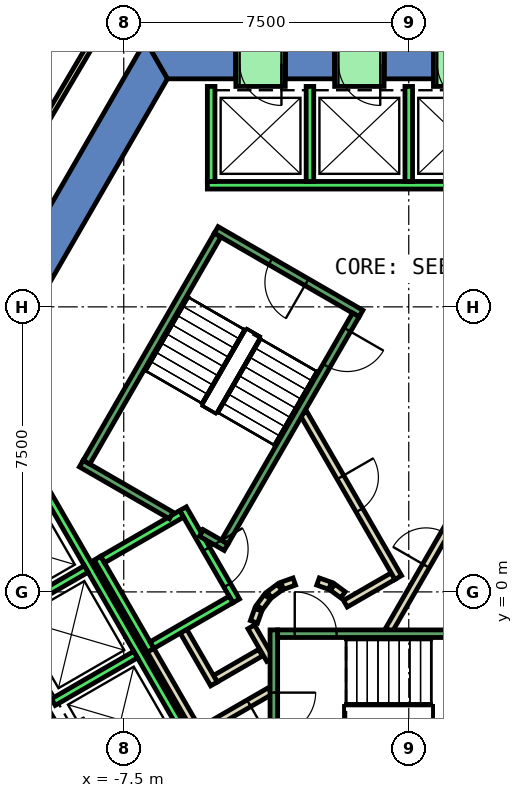
"""IFC4 building model, lengths in metres.
Left out: names, types, materials, properties, quantities, classifications, styles, units other than length and angle.
Written with IfcOpenShell. Run it as: python <this file> out.ifc"""

import sys

from ifc_helpers import new_model, si_unit, direction, frame, frame_2d, origin, place, context, subcontext, project, spatial, polyline, rectangle, outline, extrude, element, fill, save


model = new_model("IFC4")
c1 = context("Model", 3, precision=1e-05, world=origin(), true_north=direction((0.0, 1.0)))
c2 = subcontext(c1, "Body", "Model", "MODEL_VIEW")
j1 = project(units=[si_unit("LENGTHUNIT", "METRE"), si_unit("PLANEANGLEUNIT", "RADIAN")], contexts=[c1])
p1 = place(None, origin())
s1 = spatial("IfcSite", under=j1, at=p1, CompositionType="ELEMENT")
p2 = place(p1, origin())
s2 = spatial("IfcBuilding", under=s1, at=p2, CompositionType="ELEMENT")
p3 = place(p2, origin())
s3 = spatial("IfcBuildingStorey", under=s2, at=p3, CompositionType="ELEMENT", Elevation=0.0)
p4 = place(p3, frame((0.0, 0.0, -0.5)))
e1 = element("IfcWall", 1, at=p4, inside=s3, PredefinedType="SHEAR", context=c2, shape_type="SweptSolid", body=[
    extrude(outline(polyline([(-0.65, 14.5), (-0.65, 13.5), (0.65, 13.5), (0.65, 14.5), (-0.65, 14.5)])), origin(), (0.0, 0.0, 1.0), 9.05),
])
p5 = place(p3, frame((0.0, 0.0, -0.5)))
e2 = element("IfcWall", 2, at=p5, inside=s3, PredefinedType="SHEAR", context=c2, shape_type="SweptSolid", body=[
    extrude(outline(polyline([(-3.25, 14.5), (-3.25, 13.5), (-1.95, 13.5), (-1.95, 14.5), (-3.25, 14.5)])), origin(), (0.0, 0.0, 1.0), 9.05),
])
p6 = place(p3, frame((0.0, 0.0, -0.5)))
e3 = element("IfcWall", 3, at=p6, inside=s3, PredefinedType="SHEAR", context=c2, shape_type="SweptSolid", body=[
    extrude(outline(polyline([(-4.55, 13.5), (-4.55, 14.5), (-6.928, 14.5), (-6.351, 13.5), (-4.55, 13.5)])), origin(), (0.0, 0.0, 1.0), 9.05),
])
p7 = place(p3, frame((0.0, 0.0, 3.6)))
e4 = element("IfcWall", 4, at=p7, inside=s3, PredefinedType="SHEAR", context=c2, shape_type="SweptSolid", body=[
    extrude(outline(polyline([(0.65, 14.5), (0.65, 13.5), (1.95, 13.5), (1.95, 14.5), (0.65, 14.5)])), origin(), (0.0, 0.0, 1.0), 4.95),
])
p8 = place(p3, frame((0.0, 0.0, 3.6)))
e5 = element("IfcWall", 5, at=p8, inside=s3, PredefinedType="SHEAR", context=c2, shape_type="SweptSolid", body=[
    extrude(outline(polyline([(-1.95, 14.5), (-1.95, 13.5), (-0.65, 13.5), (-0.65, 14.5), (-1.95, 14.5)])), origin(), (0.0, 0.0, 1.0), 4.95),
])
p9 = place(p3, frame((0.0, 0.0, 3.6)))
e6 = element("IfcWall", 6, at=p9, inside=s3, PredefinedType="SHEAR", context=c2, shape_type="SweptSolid", body=[
    extrude(outline(polyline([(-4.55, 14.5), (-4.55, 13.5), (-3.25, 13.5), (-3.25, 14.5), (-4.55, 14.5)])), origin(), (0.0, 0.0, 1.0), 4.95),
])
p10 = place(p3, frame((0.0, 0.0, -0.5)))
e7 = element("IfcWall", 7, at=p10, inside=s3, PredefinedType="SHEAR", context=c2, shape_type="SweptSolid", body=[
    extrude(outline(polyline([(-12.267, 5.252), (-11.402, 4.752), (-6.351, 13.5), (-6.928, 14.5), (-12.267, 5.252)])), origin(), (0.0, 0.0, 1.0), 9.05),
])
p11 = place(p3, frame((0.0, 0.0, -0.5)))
e8 = element("IfcWall", 8, at=p11, inside=s3, PredefinedType="SHEAR", context=c2, shape_type="SweptSolid", body=[
    extrude(outline(polyline([(-10.067, -4.063), (-9.201, -3.563), (-9.851, -2.437), (-10.717, -2.937), (-10.067, -4.063)])), origin(), (0.0, 0.0, 1.0), 9.05),
])
p12 = place(p3, frame((-3.9, -1.599, 0.0), z_axis=(0.0, 0.0, 1.0), x_axis=(-0.865969445389, -0.500096910261, 0.0)))
e9 = element("IfcWall", 9, at=p12, inside=s3, PredefinedType="PARTITIONING", context=c2, shape_type="SweptSolid", body=[
    extrude(rectangle(XDim=1.373, YDim=0.2, at=frame_2d((0.687, 0.0))), origin(), (0.0, 0.0, 1.0), 8.55),
])
p13 = place(p3, frame((-5.126, -2.422, 0.0), z_axis=(0.0, 0.0, 1.0), x_axis=(-0.500062241894, 0.865989465428, 0.0)))
e10 = element("IfcWall", 10, at=p13, inside=s3, PredefinedType="PARTITIONING", context=c2, shape_type="SweptSolid", body=[
    extrude(rectangle(XDim=1.7, YDim=0.2, at=frame_2d((0.85, 0.0))), origin(), (0.0, 0.0, 1.0), 8.55),
])
p14 = place(p3, frame((-5.492, -3.788, 0.0), z_axis=(0.0, 0.0, 1.0), x_axis=(-0.500008949224, 0.866020236886, 0.0)))
e11 = element("IfcWall", 11, at=p14, inside=s3, PredefinedType="PARTITIONING", context=c2, shape_type="SweptSolid", body=[
    extrude(rectangle(XDim=2.68, YDim=0.2, at=frame_2d((1.34, 0.0))), origin(), (0.0, 0.0, 1.0), 8.55),
])
p15 = place(p3, frame((-4.145, -0.92, 0.0), z_axis=(0.0, 0.0, 1.0), x_axis=(0.499743786207, -0.866173278362, 0.0)))
e12 = element("IfcWall", 12, at=p15, inside=s3, PredefinedType="PARTITIONING", context=c2, shape_type="SweptSolid", body=[
    extrude(rectangle(XDim=0.991, YDim=0.2, at=frame_2d((0.495, 0.0))), origin(), (0.0, 0.0, 1.0), 8.55),
])
p16 = place(p3, frame((-3.65, -2.61, 0.0), z_axis=(0.0, 0.0, 1.0), x_axis=(-0.866072462134, -0.499918483688, 0.0)))
e13 = element("IfcWall", 13, at=p16, inside=s3, PredefinedType="PARTITIONING", context=c2, shape_type="SweptSolid", body=[
    extrude(rectangle(XDim=2.084, YDim=0.2, at=frame_2d((1.042, 0.0))), origin(), (0.0, 0.0, 1.0), 8.55),
])
p17 = place(p16, frame((0.642, 0.0, 0.0)))
e14 = element("IfcOpeningElement", 14, at=p17, cuts=e13, PredefinedType="OPENING", context=c2, shape_type="SweptSolid", body=[
    extrude(rectangle(XDim=0.9, YDim=2.1, at=frame_2d((0.45, 1.05))), frame((0.0, 0.11, 0.0), z_axis=(0.0, -1.0, 0.0), x_axis=(1.0, 0.0, 0.0)), (0.0, 0.0, 1.0), 0.22),
])
p18 = place(p3, frame((-0.52, -1.0, 0.0), z_axis=(0.0, 0.0, 1.0), x_axis=(0.50011622646, 0.865958290007, 0.0)))
e15 = element("IfcWall", 15, at=p18, inside=s3, PredefinedType="PARTITIONING", context=c2, shape_type="SweptSolid", body=[
    extrude(rectangle(XDim=4.991, YDim=0.2, at=frame_2d((2.496, 0.0))), origin(), (0.0, 0.0, 1.0), 8.55),
])
p19 = place(p18, frame((1.945, 0.0, 0.0)))
e16 = element("IfcOpeningElement", 16, at=p19, cuts=e15, PredefinedType="OPENING", context=c2, shape_type="SweptSolid", body=[
    extrude(rectangle(XDim=1.0, YDim=2.1, at=frame_2d((0.5, 1.05))), frame((0.0, 0.11, 0.0), z_axis=(0.0, -1.0, 0.0), x_axis=(1.0, 0.0, 0.0)), (0.0, 0.0, 1.0), 0.22),
])
p20 = place(p3, frame((-0.412, 0.414, 0.0), z_axis=(0.0, 0.0, 1.0), x_axis=(-0.866017369001, -0.500013916395, 0.0)))
e17 = element("IfcWall", 17, at=p20, inside=s3, PredefinedType="PARTITIONING", context=c2, shape_type="SweptSolid", body=[
    extrude(rectangle(XDim=1.45, YDim=0.2, at=frame_2d((0.725, 0.0))), origin(), (0.0, 0.0, 1.0), 8.55),
])
p21 = place(p3, frame((-1.731, -0.077, 0.0), z_axis=(0.0, 0.0, 1.0), x_axis=(-0.804311165252, 0.594208338422, 0.0)))
e18 = element("IfcWall", 18, at=p21, inside=s3, PredefinedType="PARTITIONING", context=c2, shape_type="SweptSolid", body=[
    extrude(rectangle(XDim=0.338, YDim=0.2, at=frame_2d((0.169, 0.0))), origin(), (0.0, 0.0, 1.0), 8.55),
])
p22 = place(p3, frame((-2.07, 0.16, 0.0), z_axis=(0.0, 0.0, 1.0), x_axis=(-0.942199461132, 0.335052496547, 0.0)))
e19 = element("IfcWall", 19, at=p22, inside=s3, PredefinedType="PARTITIONING", context=c2, shape_type="SweptSolid", body=[
    extrude(rectangle(XDim=0.337, YDim=0.2, at=frame_2d((0.169, 0.0))), origin(), (0.0, 0.0, 1.0), 8.55),
])
p23 = place(p3, frame((-3.012, 0.273, 0.0), z_axis=(0.0, 0.0, 1.0), x_axis=(-0.942280615813, -0.334824194261, 0.0)))
e20 = element("IfcWall", 20, at=p23, inside=s3, PredefinedType="PARTITIONING", context=c2, shape_type="SweptSolid", body=[
    extrude(rectangle(XDim=0.338, YDim=0.2, at=frame_2d((0.169, 0.0))), origin(), (0.0, 0.0, 1.0), 8.55),
])
p24 = place(p3, frame((-3.397, 0.124, 0.0), z_axis=(0.0, 0.0, 1.0), x_axis=(-0.804311165252, -0.594208338422, 0.0)))
e21 = element("IfcWall", 21, at=p24, inside=s3, PredefinedType="PARTITIONING", context=c2, shape_type="SweptSolid", body=[
    extrude(rectangle(XDim=0.338, YDim=0.2, at=frame_2d((0.169, 0.0))), origin(), (0.0, 0.0, 1.0), 8.55),
])
p25 = place(p3, frame((-3.723, -0.131, 0.0), z_axis=(0.0, 0.0, 1.0), x_axis=(-0.594675113454, -0.803966112121, 0.0)))
e22 = element("IfcWall", 22, at=p25, inside=s3, PredefinedType="PARTITIONING", context=c2, shape_type="SweptSolid", body=[
    extrude(rectangle(XDim=0.338, YDim=0.2, at=frame_2d((0.169, 0.0))), origin(), (0.0, 0.0, 1.0), 8.55),
])
p26 = place(p3, frame((-3.96, -0.47, 0.0), z_axis=(0.0, 0.0, 1.0), x_axis=(-0.334824194261, -0.942280615813, 0.0)))
e23 = element("IfcWall", 23, at=p26, inside=s3, PredefinedType="PARTITIONING", context=c2, shape_type="SweptSolid", body=[
    extrude(rectangle(XDim=0.338, YDim=0.2, at=frame_2d((0.169, 0.0))), origin(), (0.0, 0.0, 1.0), 8.55),
])
p27 = place(p3, frame((-2.771, 4.7, 0.0), z_axis=(0.0, 0.0, 1.0), x_axis=(0.499969479948, -0.866043023828, 0.0)))
e24 = element("IfcWall", 24, at=p27, inside=s3, PredefinedType="PARTITIONING", context=c2, shape_type="SweptSolid", body=[
    extrude(rectangle(XDim=4.99, YDim=0.2, at=frame_2d((2.495, 0.0))), origin(), (0.0, 0.0, 1.0), 8.55),
])
p28 = place(p27, frame((1.945, 0.0, 0.0)))
e25 = element("IfcOpeningElement", 25, at=p28, cuts=e24, PredefinedType="OPENING", context=c2, shape_type="SweptSolid", body=[
    extrude(rectangle(XDim=1.0, YDim=2.1, at=frame_2d((0.5, 1.05))), frame((0.0, 0.11, 0.0), z_axis=(0.0, -1.0, 0.0), x_axis=(1.0, 0.0, 0.0)), (0.0, 0.0, 1.0), 0.22),
])
p29 = place(p3, frame((-18.107, 2.457, 0.0), z_axis=(0.0, 0.0, 1.0), x_axis=(0.499997929316, 0.866026599291, 0.0)))
e26 = element("IfcWall", 26, at=p29, inside=s3, PredefinedType="PARTITIONING", context=c2, shape_type="SweptSolid", body=[
    extrude(rectangle(XDim=18.182, YDim=0.1, at=frame_2d((9.091, 0.0))), origin(), (0.0, 0.0, 1.0), 8.55),
])
p30 = place(p29, frame((4.754, 0.0, 0.0)))
e27 = element("IfcOpeningElement", 27, at=p30, cuts=e26, PredefinedType="OPENING", context=c2, shape_type="SweptSolid", body=[
    extrude(rectangle(XDim=1.8, YDim=2.1, at=frame_2d((0.9, 1.05))), frame((0.0, 0.06, 0.0), z_axis=(0.0, -1.0, 0.0), x_axis=(1.0, 0.0, 0.0)), (0.0, 0.0, 1.0), 0.12),
])
p31 = place(p3, frame((-7.104, 16.539, 0.0), z_axis=(0.0, 0.0, 1.0), x_axis=(-0.508323844405, -0.861165993992, 0.0)))
e28 = element("IfcWall", 28, at=p31, inside=s3, PredefinedType="PARTITIONING", context=c2, shape_type="SweptSolid", body=[
    extrude(rectangle(XDim=7.182, YDim=0.15, at=frame_2d((3.591, 0.0))), origin(), (0.0, 0.0, 1.0), 8.55),
])
p32 = place(p3, frame((5.3, 10.7, 0.0), z_axis=(0.0, 0.0, 1.0), x_axis=(-1.0, 0.0, 0.0)))
e29 = element("IfcWall", 29, at=p32, inside=s3, PredefinedType="STANDARD", context=c2, shape_type="SweptSolid", body=[
    extrude(rectangle(XDim=10.6, YDim=0.2, at=frame_2d((5.3, 0.0))), origin(), (0.0, 0.0, 1.0), 8.55),
])
for number, where, z_axis, x_axis in (
    (30, (0.0, 10.8, 0.0), (0.0, 0.0, 1.0), (0.0, 1.0, 0.0)),
    (31, (-2.6, 10.8, 0.0), (0.0, 0.0, 1.0), (0.0, 1.0, 0.0)),
    (32, (-5.2, 10.8, 0.0), (0.0, 0.0, 1.0), (0.0, 1.0, 0.0)),
):
    element("IfcWall", number, at=place(p3, frame(where, z_axis=z_axis, x_axis=x_axis)), inside=s3, PredefinedType="STANDARD", context=c2, shape_type="SweptSolid", body=[
        extrude(rectangle(XDim=2.5, YDim=0.2, at=frame_2d((1.25, 0.0))), origin(), (0.0, 0.0, 1.0), 8.55),
    ])
p33 = place(p3, frame((-5.94, 2.188, 0.0), z_axis=(0.0, 0.0, 1.0), x_axis=(0.49994636267, -0.866056369097, 0.0)))
e33 = element("IfcWall", 33, at=p33, inside=s3, PredefinedType="STANDARD", context=c2, shape_type="SweptSolid", body=[
    extrude(rectangle(XDim=2.8, YDim=0.2, at=frame_2d((1.4, 0.0))), origin(), (0.0, 0.0, 1.0), 8.55),
])
p34 = place(p33, frame((1.225, 0.0, 0.0)))
e34 = element("IfcOpeningElement", 34, at=p34, cuts=e33, PredefinedType="OPENING", context=c2, shape_type="SweptSolid", body=[
    extrude(rectangle(XDim=1.1, YDim=2.1, at=frame_2d((0.55, 1.05))), frame((0.0, 0.11, 0.0), z_axis=(0.0, -1.0, 0.0), x_axis=(1.0, 0.0, 0.0)), (0.0, 0.0, 1.0), 0.22),
])
p35 = place(p3, frame((-8.192, 0.888, 0.0), z_axis=(0.0, 0.0, 1.0), x_axis=(0.49994636267, -0.866056369097, 0.0)))
e35 = element("IfcWall", 35, at=p35, inside=s3, PredefinedType="STANDARD", context=c2, shape_type="SweptSolid", body=[
    extrude(rectangle(XDim=2.8, YDim=0.2, at=frame_2d((1.4, 0.0))), origin(), (0.0, 0.0, 1.0), 8.55),
])
for number, where, z_axis, x_axis in (
    (36, (-5.977, 2.052, 0.0), (0.0, 0.0, 1.0), (-0.866, -0.5, 0.0)),
    (37, (-4.677, -0.2, 0.0), (0.0, 0.0, 1.0), (-0.866, -0.5, 0.0)),
):
    element("IfcWall", number, at=place(p3, frame(where, z_axis=z_axis, x_axis=x_axis)), inside=s3, PredefinedType="STANDARD", context=c2, shape_type="SweptSolid", body=[
        extrude(rectangle(XDim=2.399, YDim=0.2, at=frame_2d((1.2, 0.0))), origin(), (0.0, 0.0, 1.0), 8.55),
    ])
p36 = place(p3, frame((-9.751, 2.99, 0.0), z_axis=(0.0, 0.0, 1.0), x_axis=(0.50000090737, -0.866024879913, 0.0)))
e38 = element("IfcWall", 38, at=p36, inside=s3, PredefinedType="STANDARD", context=c2, shape_type="SweptSolid", body=[
    extrude(rectangle(XDim=10.6, YDim=0.2, at=frame_2d((5.3, 0.0))), origin(), (0.0, 0.0, 1.0), 8.55),
])
for number, where, z_axis, x_axis in (
    (39, (-8.488, 0.602, 0.0), (0.0, 0.0, 1.0), (-0.866, -0.5, 0.0)),
    (40, (-7.188, -1.65, 0.0), (0.0, 0.0, 1.0), (-0.866, -0.5, 0.0)),
):
    element("IfcWall", number, at=place(p3, frame(where, z_axis=z_axis, x_axis=x_axis)), inside=s3, PredefinedType="STANDARD", context=c2, shape_type="SweptSolid", body=[
        extrude(rectangle(XDim=2.5, YDim=0.2, at=frame_2d((1.25, 0.0))), origin(), (0.0, 0.0, 1.0), 8.55),
    ])
p37 = place(p3, frame((1.95, 13.9, 0.0), z_axis=(0.0, 0.0, 1.0), x_axis=(-1.0, 0.0, 0.0)))
e41 = element("IfcWall", 41, at=p37, inside=s3, PredefinedType="STANDARD", context=c2, shape_type="SweptSolid", body=[
    extrude(rectangle(XDim=1.3, YDim=1.2, at=frame_2d((0.65, 0.0))), origin(), (0.0, 0.0, 1.0), 2.4),
])
p38 = place(p37, frame((0.1, 0.0, 0.0)))
e42 = element("IfcOpeningElement", 42, at=p38, cuts=e41, PredefinedType="OPENING", context=c2, shape_type="SweptSolid", body=[
    extrude(rectangle(XDim=1.1, YDim=2.3, at=frame_2d((0.55, 1.15))), frame((0.0, 0.61, 0.0), z_axis=(0.0, -1.0, 0.0), x_axis=(1.0, 0.0, 0.0)), (0.0, 0.0, 1.0), 1.22),
])
p39 = place(p3, frame((-0.65, 13.9, 0.0), z_axis=(0.0, 0.0, 1.0), x_axis=(-1.0, 0.0, 0.0)))
e43 = element("IfcWall", 43, at=p39, inside=s3, PredefinedType="STANDARD", context=c2, shape_type="SweptSolid", body=[
    extrude(rectangle(XDim=1.3, YDim=1.2, at=frame_2d((0.65, 0.0))), origin(), (0.0, 0.0, 1.0), 2.4),
])
p40 = place(p39, frame((0.1, 0.0, 0.0)))
e44 = element("IfcOpeningElement", 44, at=p40, cuts=e43, PredefinedType="OPENING", context=c2, shape_type="SweptSolid", body=[
    extrude(rectangle(XDim=1.1, YDim=2.3, at=frame_2d((0.55, 1.15))), frame((0.0, 0.61, 0.0), z_axis=(0.0, -1.0, 0.0), x_axis=(1.0, 0.0, 0.0)), (0.0, 0.0, 1.0), 1.22),
])
p41 = place(p3, frame((-3.25, 13.9, 0.0), z_axis=(0.0, 0.0, 1.0), x_axis=(-1.0, 0.0, 0.0)))
e45 = element("IfcWall", 45, at=p41, inside=s3, PredefinedType="STANDARD", context=c2, shape_type="SweptSolid", body=[
    extrude(rectangle(XDim=1.3, YDim=1.2, at=frame_2d((0.65, 0.0))), origin(), (0.0, 0.0, 1.0), 2.4),
])
p42 = place(p41, frame((0.1, 0.0, 0.0)))
e46 = element("IfcOpeningElement", 46, at=p42, cuts=e45, PredefinedType="OPENING", context=c2, shape_type="SweptSolid", body=[
    extrude(rectangle(XDim=1.1, YDim=2.3, at=frame_2d((0.55, 1.15))), frame((0.0, 0.61, 0.0), z_axis=(0.0, -1.0, 0.0), x_axis=(1.0, 0.0, 0.0)), (0.0, 0.0, 1.0), 1.22),
])
p43 = place(p3, frame((-3.55, -1.0, 0.0), z_axis=(0.0, 0.0, 1.0), x_axis=(0.0, -1.0, 0.0)))
e47 = element("IfcWall", 47, at=p43, inside=s3, PredefinedType="STANDARD", context=c2, shape_type="SweptSolid", body=[
    extrude(rectangle(XDim=4.4, YDim=0.2, at=frame_2d((2.2, 0.0))), origin(), (0.0, 0.0, 1.0), 8.55),
])
p44 = place(p43, frame((1.65, 0.0, 0.0)))
e48 = element("IfcOpeningElement", 48, at=p44, cuts=e47, PredefinedType="OPENING", context=c2, shape_type="SweptSolid", body=[
    extrude(rectangle(XDim=1.1, YDim=2.2, at=frame_2d((0.55, 1.1))), frame((0.0, 0.11, 0.0), z_axis=(0.0, -1.0, 0.0), x_axis=(1.0, 0.0, 0.0)), (0.0, 0.0, 1.0), 0.22),
])
p45 = place(p3, frame((-3.45, -1.1, 0.0), z_axis=(0.0, 0.0, 1.0), x_axis=(1.0, 0.0, 0.0)))
e49 = element("IfcWall", 49, at=p45, inside=s3, PredefinedType="STANDARD", context=c2, shape_type="SweptSolid", body=[
    extrude(rectangle(XDim=6.9, YDim=0.2, at=frame_2d((3.45, 0.0))), origin(), (0.0, 0.0, 1.0), 8.55),
])
p46 = place(p45, frame((0.45, 0.0, 0.0)))
e50 = element("IfcOpeningElement", 50, at=p46, cuts=e49, PredefinedType="OPENING", context=c2, shape_type="SweptSolid", body=[
    extrude(rectangle(XDim=1.1, YDim=2.2, at=frame_2d((0.55, 1.1))), frame((0.0, 0.11, 0.0), z_axis=(0.0, -1.0, 0.0), x_axis=(1.0, 0.0, 0.0)), (0.0, 0.0, 1.0), 0.22),
])
p47 = place(p3, frame((-1.256, 7.324, 0.0), z_axis=(0.0, 0.0, 1.0), x_axis=(-0.866046073146, 0.499964197906, 0.0)))
e51 = element("IfcWall", 51, at=p47, inside=s3, PredefinedType="STANDARD", context=c2, shape_type="SweptSolid", body=[
    extrude(rectangle(XDim=4.4, YDim=0.2, at=frame_2d((2.2, 0.0))), origin(), (0.0, 0.0, 1.0), 8.55),
])
p48 = place(p47, frame((1.65, 0.0, 0.0)))
e52 = element("IfcOpeningElement", 52, at=p48, cuts=e51, PredefinedType="OPENING", context=c2, shape_type="SweptSolid", body=[
    extrude(rectangle(XDim=1.1, YDim=2.2, at=frame_2d((0.55, 1.1))), frame((0.0, 0.11, 0.0), z_axis=(0.0, -1.0, 0.0), x_axis=(1.0, 0.0, 0.0)), (0.0, 0.0, 1.0), 0.22),
])
p49 = place(p3, frame((-6.25, 2.01, 0.0), z_axis=(0.0, 0.0, 1.0), x_axis=(-0.86611865017, 0.499838457731, 0.0)))
e53 = element("IfcWall", 53, at=p49, inside=s3, PredefinedType="STANDARD", context=c2, shape_type="SweptSolid", body=[
    extrude(rectangle(XDim=2.733, YDim=0.2, at=frame_2d((1.366, 0.0))), origin(), (0.0, 0.0, 1.0), 8.55),
])
p50 = place(p3, frame((-4.806, 1.176, 0.0), z_axis=(0.0, 0.0, 1.0), x_axis=(-0.866558586415, 0.499075361355, 0.0)))
e54 = element("IfcWall", 54, at=p50, inside=s3, PredefinedType="STANDARD", context=c2, shape_type="SweptSolid", body=[
    extrude(rectangle(XDim=0.751, YDim=0.2, at=frame_2d((0.376, 0.0))), origin(), (0.0, 0.0, 1.0), 8.55),
])
p51 = place(p3, frame((-1.393, 7.288, 0.0), z_axis=(0.0, 0.0, 1.0), x_axis=(-0.499963383562, -0.866046543262, 0.0)))
e55 = element("IfcWall", 55, at=p51, inside=s3, PredefinedType="STANDARD", context=c2, shape_type="SweptSolid", body=[
    extrude(rectangle(XDim=6.9, YDim=0.2, at=frame_2d((3.45, 0.0))), origin(), (0.0, 0.0, 1.0), 8.55),
])
p52 = place(p51, frame((0.45, 0.0, 0.0)))
e56 = element("IfcOpeningElement", 56, at=p52, cuts=e55, PredefinedType="OPENING", context=c2, shape_type="SweptSolid", body=[
    extrude(rectangle(XDim=1.1, YDim=2.2, at=frame_2d((0.55, 1.1))), frame((0.0, 0.11, 0.0), z_axis=(0.0, -1.0, 0.0), x_axis=(1.0, 0.0, 0.0)), (0.0, 0.0, 1.0), 0.22),
])
p53 = place(p3, frame((-5.03, 9.388, 0.0), z_axis=(0.0, 0.0, 1.0), x_axis=(-0.499978703459, -0.866037698999, 0.0)))
e57 = element("IfcWall", 57, at=p53, inside=s3, PredefinedType="STANDARD", context=c2, shape_type="SweptSolid", body=[
    extrude(rectangle(XDim=6.9, YDim=0.2, at=frame_2d((3.45, 0.0))), origin(), (0.0, 0.0, 1.0), 8.55),
])
p54 = place(p19, origin())
e58 = element("IfcDoor", 58, at=p54, inside=s3, OperationType="SINGLE_SWING_LEFT", PredefinedType="DOOR", context=c2, shape_type="SweptSolid", body=[
    extrude(rectangle(XDim=1.0, YDim=2.1, at=frame_2d((0.5, 1.05))), frame((0.0, 0.025, 0.0), z_axis=(0.0, -1.0, 0.0), x_axis=(1.0, 0.0, 0.0)), (0.0, 0.0, 1.0), 0.05),
])
fill(e16, e58)
p55 = place(p28, origin())
e59 = element("IfcDoor", 59, at=p55, inside=s3, OperationType="SINGLE_SWING_RIGHT", PredefinedType="DOOR", context=c2, shape_type="SweptSolid", body=[
    extrude(rectangle(XDim=1.0, YDim=2.1, at=frame_2d((0.5, 1.05))), frame((0.0, 0.025, 0.0), z_axis=(0.0, -1.0, 0.0), x_axis=(1.0, 0.0, 0.0)), (0.0, 0.0, 1.0), 0.05),
])
fill(e25, e59)
p56 = place(p17, origin())
e60 = element("IfcDoor", 60, at=p56, inside=s3, OperationType="SINGLE_SWING_LEFT", PredefinedType="DOOR", context=c2, shape_type="SweptSolid", body=[
    extrude(rectangle(XDim=0.9, YDim=2.1, at=frame_2d((0.45, 1.05))), frame((0.0, 0.025, 0.0), z_axis=(0.0, -1.0, 0.0), x_axis=(1.0, 0.0, 0.0)), (0.0, 0.0, 1.0), 0.05),
])
fill(e14, e60)
p57 = place(p38, origin())
e61 = element("IfcDoor", 61, at=p57, inside=s3, OperationType="SLIDING_TO_LEFT", PredefinedType="DOOR", context=c2, shape_type="SweptSolid", body=[
    extrude(rectangle(XDim=1.1, YDim=2.3, at=frame_2d((0.55, 1.15))), frame((0.0, 0.025, 0.0), z_axis=(0.0, -1.0, 0.0), x_axis=(1.0, 0.0, 0.0)), (0.0, 0.0, 1.0), 0.05),
])
fill(e42, e61)
p58 = place(p40, origin())
e62 = element("IfcDoor", 62, at=p58, inside=s3, OperationType="SLIDING_TO_LEFT", PredefinedType="DOOR", context=c2, shape_type="SweptSolid", body=[
    extrude(rectangle(XDim=1.1, YDim=2.3, at=frame_2d((0.55, 1.15))), frame((0.0, 0.025, 0.0), z_axis=(0.0, -1.0, 0.0), x_axis=(1.0, 0.0, 0.0)), (0.0, 0.0, 1.0), 0.05),
])
fill(e44, e62)
p59 = place(p42, origin())
e63 = element("IfcDoor", 63, at=p59, inside=s3, OperationType="SLIDING_TO_LEFT", PredefinedType="DOOR", context=c2, shape_type="SweptSolid", body=[
    extrude(rectangle(XDim=1.1, YDim=2.3, at=frame_2d((0.55, 1.15))), frame((0.0, 0.025, 0.0), z_axis=(0.0, -1.0, 0.0), x_axis=(1.0, 0.0, 0.0)), (0.0, 0.0, 1.0), 0.05),
])
fill(e46, e63)
p60 = place(p34, origin())
e64 = element("IfcDoor", 64, at=p60, inside=s3, OperationType="SLIDING_TO_LEFT", PredefinedType="DOOR", context=c2, shape_type="SweptSolid", body=[
    extrude(rectangle(XDim=1.1, YDim=2.1, at=frame_2d((0.55, 1.05))), frame((0.0, 0.025, 0.0), z_axis=(0.0, -1.0, 0.0), x_axis=(1.0, 0.0, 0.0)), (0.0, 0.0, 1.0), 0.05),
])
fill(e34, e64)
p61 = place(p46, origin())
e65 = element("IfcDoor", 65, at=p61, inside=s3, OperationType="SINGLE_SWING_LEFT", PredefinedType="DOOR", context=c2, shape_type="SweptSolid", body=[
    extrude(rectangle(XDim=1.1, YDim=2.2, at=frame_2d((0.55, 1.1))), frame((0.0, 0.025, 0.0), z_axis=(0.0, -1.0, 0.0), x_axis=(1.0, 0.0, 0.0)), (0.0, 0.0, 1.0), 0.05),
])
fill(e50, e65)
p62 = place(p44, origin())
e66 = element("IfcDoor", 66, at=p62, inside=s3, OperationType="SINGLE_SWING_LEFT", PredefinedType="DOOR", context=c2, shape_type="SweptSolid", body=[
    extrude(rectangle(XDim=1.1, YDim=2.2, at=frame_2d((0.55, 1.1))), frame((0.0, 0.025, 0.0), z_axis=(0.0, -1.0, 0.0), x_axis=(1.0, 0.0, 0.0)), (0.0, 0.0, 1.0), 0.05),
])
fill(e48, e66)
p63 = place(p52, origin())
e67 = element("IfcDoor", 67, at=p63, inside=s3, OperationType="SINGLE_SWING_LEFT", PredefinedType="DOOR", context=c2, shape_type="SweptSolid", body=[
    extrude(rectangle(XDim=1.1, YDim=2.2, at=frame_2d((0.55, 1.1))), frame((0.0, 0.025, 0.0), z_axis=(0.0, -1.0, 0.0), x_axis=(1.0, 0.0, 0.0)), (0.0, 0.0, 1.0), 0.05),
])
fill(e56, e67)
p64 = place(p48, origin())
e68 = element("IfcDoor", 68, at=p64, inside=s3, OperationType="SINGLE_SWING_LEFT", PredefinedType="DOOR", context=c2, shape_type="SweptSolid", body=[
    extrude(rectangle(XDim=1.1, YDim=2.2, at=frame_2d((0.55, 1.1))), frame((0.0, 0.025, 0.0), z_axis=(0.0, -1.0, 0.0), x_axis=(1.0, 0.0, 0.0)), (0.0, 0.0, 1.0), 0.05),
])
fill(e52, e68)
save(model, sys.argv[1])
